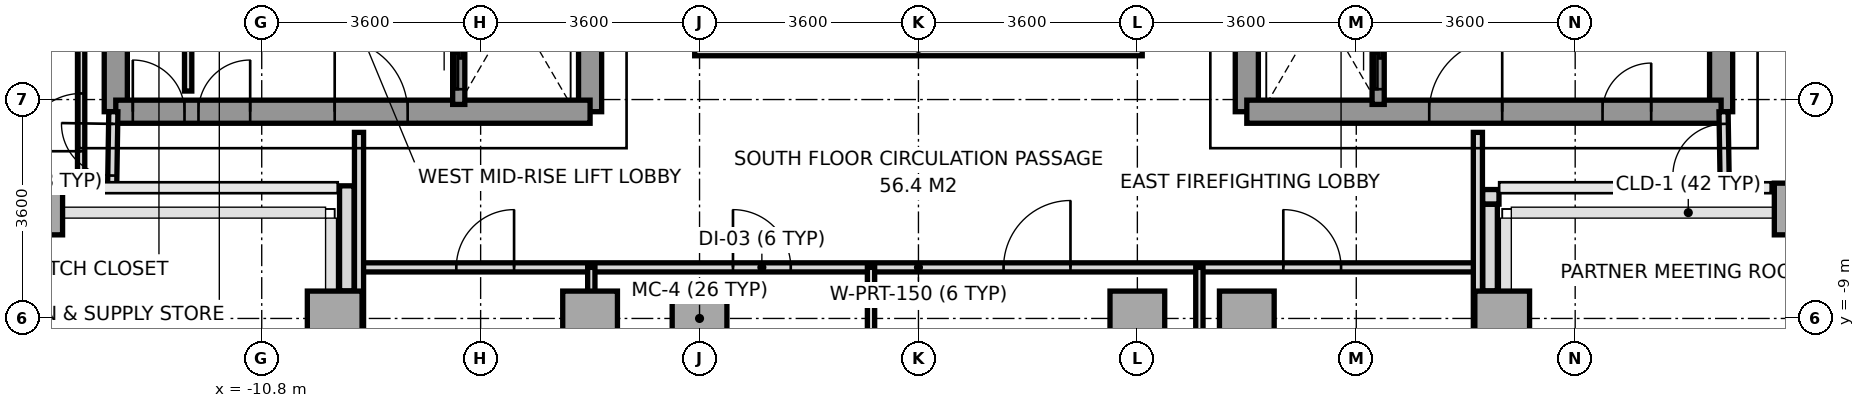
"""IFC4 building model, lengths in metres.
Left out: names, types, materials, properties, quantities, classifications, styles, units other than length and angle.
Written with IfcOpenShell. Run it as: python <this file> out.ifc"""

import sys

from ifc_helpers import new_model, si_unit, direction, frame, frame_2d, origin, origin_2d, place, context, subcontext, project, spatial, rectangle, extrude, source, transform, mapped, element, fill, save


model = new_model("IFC4")
c1 = context("Model", 3, precision=1e-05, world=origin(), true_north=direction((0.0, 1.0)))
c2 = subcontext(c1, "Body", "Model", "MODEL_VIEW")
j1 = project(units=[si_unit("LENGTHUNIT", "METRE"), si_unit("PLANEANGLEUNIT", "RADIAN")], contexts=[c1])
p1 = place(None, origin())
s1 = spatial("IfcSite", under=j1, at=p1, CompositionType="ELEMENT")
p2 = place(p1, origin())
s2 = spatial("IfcBuilding", under=s1, at=p2, CompositionType="ELEMENT")
p3 = place(p2, frame((0.0, 0.0, 167.2)))
s3 = spatial("IfcBuildingStorey", under=s2, at=p3, CompositionType="ELEMENT", Elevation=167.2)
m1 = source(origin(), c2, "Body", "SweptSolid", [
    extrude(rectangle(XDim=0.65, YDim=0.85, at=origin_2d()), origin(), (0.0, 0.0, 1.0), 3.2),
])
p4 = place(p3, frame((-14.4, -7.2, 0.0), z_axis=(0.0, 0.0, 1.0), x_axis=(1.0, 0.0, 0.0)))
e1 = element("IfcColumn", 1, at=p4, inside=s3, PredefinedType="COLUMN", context=c2, shape_type="MappedRepresentation", body=[
    mapped(m1, transform((0.0, 0.0, 0.0), x_axis=(1.0, 0.0, 0.0), y_axis=(0.0, 1.0, 0.0), z_axis=(0.0, 0.0, 1.0), scale=1.0)),
])
m2 = source(origin(), c2, "Body", "SweptSolid", [
    extrude(rectangle(XDim=0.9, YDim=0.9, at=origin_2d()), origin(), (0.0, 0.0, 1.0), 3.2),
])
for number, where, z_axis, x_axis in (
    (2, (-9.6, -9.0, 0.0), (0.0, 0.0, 1.0), (1.0, 0.0, 0.0)),
    (3, (-5.4, -9.0, 0.0), (0.0, 0.0, 1.0), (1.0, 0.0, 0.0)),
    (4, (-3.6, -9.0, 0.0), (0.0, 0.0, 1.0), (1.0, 0.0, 0.0)),
    (5, (3.6, -9.0, 0.0), (0.0, 0.0, 1.0), (1.0, 0.0, 0.0)),
    (6, (5.4, -9.0, 0.0), (0.0, 0.0, 1.0), (1.0, 0.0, 0.0)),
    (7, (9.6, -9.0, 0.0), (0.0, 0.0, 1.0), (1.0, 0.0, 0.0)),
):
    element("IfcColumn", number, at=place(p3, frame(where, z_axis=z_axis, x_axis=x_axis)), inside=s3, PredefinedType="COLUMN", context=c2, shape_type="MappedRepresentation", body=[
        mapped(m2, transform((0.0, 0.0, 0.0), x_axis=(1.0, 0.0, 0.0), y_axis=(0.0, 1.0, 0.0), z_axis=(0.0, 0.0, 1.0), scale=1.0)),
    ])
p5 = place(p3, frame((14.4, -7.2, 0.0), z_axis=(0.0, 0.0, 1.0), x_axis=(1.0, 0.0, 0.0)))
e8 = element("IfcColumn", 8, at=p5, inside=s3, PredefinedType="COLUMN", context=c2, shape_type="MappedRepresentation", body=[
    mapped(m1, transform((0.0, 0.0, 0.0), x_axis=(1.0, 0.0, 0.0), y_axis=(0.0, 1.0, 0.0), z_axis=(0.0, 0.0, 1.0), scale=1.0)),
])
p6 = place(p3, frame((9.547, -7.0, 0.0), z_axis=(0.0, 0.0, 1.0), x_axis=(-1.0, 0.0, 0.0)))
e9 = element("IfcWall", 9, at=p6, inside=s3, PredefinedType="PARAPET", context=c2, shape_type="SweptSolid", body=[
    extrude(rectangle(XDim=0.269, YDim=0.24, at=frame_2d((0.135, 0.0))), origin(), (0.0, 0.0, 1.0), 1.15),
])
p7 = place(p3, frame((9.4, -7.123, 0.0), z_axis=(0.0, 0.0, 1.0), x_axis=(0.0, -1.0, 0.0)))
e10 = element("IfcWall", 10, at=p7, inside=s3, PredefinedType="PARAPET", context=c2, shape_type="SweptSolid", body=[
    extrude(rectangle(XDim=1.424, YDim=0.24, at=frame_2d((0.712, 0.0))), origin(), (0.0, 0.0, 1.0), 1.15),
])
p8 = place(p3, frame((-9.4, -8.547, 0.0), z_axis=(0.0, 0.0, 1.0), x_axis=(0.0, 1.0, 0.0)))
e11 = element("IfcWall", 11, at=p8, inside=s3, PredefinedType="PARAPET", context=c2, shape_type="SweptSolid", body=[
    extrude(rectangle(XDim=1.728, YDim=0.24, at=frame_2d((0.864, 0.0))), origin(), (0.0, 0.0, 1.0), 1.15),
])
p9 = place(p3, frame((-13.2, -5.6, 0.0), z_axis=(0.0, 0.0, 1.0), x_axis=(0.0, 1.0, 0.0)))
e12 = element("IfcWall", 12, at=p9, inside=s3, PredefinedType="SHEAR", context=c2, shape_type="SweptSolid", body=[
    extrude(rectangle(XDim=11.2, YDim=0.38, at=frame_2d((5.6, 0.0))), origin(), (0.0, 0.0, 1.0), 3.2),
])
p10 = place(p3, frame((-5.4, -5.6, 0.0), z_axis=(0.0, 0.0, 1.0), x_axis=(0.0, 1.0, 0.0)))
e13 = element("IfcWall", 13, at=p10, inside=s3, PredefinedType="SHEAR", context=c2, shape_type="SweptSolid", body=[
    extrude(rectangle(XDim=12.5, YDim=0.38, at=frame_2d((6.25, 0.0))), origin(), (0.0, 0.0, 1.0), 3.2),
])
p11 = place(p10, frame((4.55, 0.0, 0.0)))
e14 = element("IfcOpeningElement", 14, at=p11, cuts=e13, PredefinedType="OPENING", context=c2, shape_type="SweptSolid", body=[
    extrude(rectangle(XDim=1.2, YDim=2.2, at=frame_2d((0.6, 1.1))), frame((0.0, 0.2, 0.0), z_axis=(0.0, -1.0, 0.0), x_axis=(1.0, 0.0, 0.0)), (0.0, 0.0, 1.0), 0.4),
])
p12 = place(p10, frame((6.86, 0.0, 0.0)))
e15 = element("IfcOpeningElement", 15, at=p12, cuts=e13, PredefinedType="OPENING", context=c2, shape_type="SweptSolid", body=[
    extrude(rectangle(XDim=0.8, YDim=2.1, at=frame_2d((0.4, 1.05))), frame((0.0, 0.2, 0.0), z_axis=(0.0, -1.0, 0.0), x_axis=(1.0, 0.0, 0.0)), (0.0, 0.0, 1.0), 0.4),
])
p13 = place(p3, frame((-13.2, -5.6, 0.0), z_axis=(0.0, 0.0, 1.0), x_axis=(1.0, 0.0, 0.0)))
e16 = element("IfcWall", 16, at=p13, inside=s3, PredefinedType="SHEAR", context=c2, shape_type="SweptSolid", body=[
    extrude(rectangle(XDim=7.8, YDim=0.38, at=frame_2d((3.9, 0.0))), origin(), (0.0, 0.0, 1.0), 3.2),
])
p14 = place(p13, frame((3.6, 0.0, 0.0)))
e17 = element("IfcOpeningElement", 17, at=p14, cuts=e16, PredefinedType="OPENING", context=c2, shape_type="SweptSolid", body=[
    extrude(rectangle(XDim=1.2, YDim=2.2, at=frame_2d((0.6, 1.1))), frame((0.0, 0.2, 0.0), z_axis=(0.0, -1.0, 0.0), x_axis=(1.0, 0.0, 0.0)), (0.0, 0.0, 1.0), 0.4),
])
p15 = place(p13, frame((0.28, 0.0, 0.0)))
e18 = element("IfcOpeningElement", 18, at=p15, cuts=e16, PredefinedType="OPENING", context=c2, shape_type="SweptSolid", body=[
    extrude(rectangle(XDim=0.85, YDim=2.1, at=frame_2d((0.425, 1.05))), frame((0.0, 0.2, 0.0), z_axis=(0.0, -1.0, 0.0), x_axis=(1.0, 0.0, 0.0)), (0.0, 0.0, 1.0), 0.4),
])
p16 = place(p13, frame((1.36, 0.0, 0.0)))
e19 = element("IfcOpeningElement", 19, at=p16, cuts=e16, PredefinedType="OPENING", context=c2, shape_type="SweptSolid", body=[
    extrude(rectangle(XDim=0.85, YDim=2.1, at=frame_2d((0.425, 1.05))), frame((0.0, 0.2, 0.0), z_axis=(0.0, -1.0, 0.0), x_axis=(1.0, 0.0, 0.0)), (0.0, 0.0, 1.0), 0.4),
])
p17 = place(p3, frame((13.2, -5.6, 0.0), z_axis=(0.0, 0.0, 1.0), x_axis=(0.0, 1.0, 0.0)))
e20 = element("IfcWall", 20, at=p17, inside=s3, PredefinedType="SHEAR", context=c2, shape_type="SweptSolid", body=[
    extrude(rectangle(XDim=11.2, YDim=0.38, at=frame_2d((5.6, 0.0))), origin(), (0.0, 0.0, 1.0), 3.2),
])
p18 = place(p3, frame((5.4, -5.6, 0.0), z_axis=(0.0, 0.0, 1.0), x_axis=(0.0, 1.0, 0.0)))
e21 = element("IfcWall", 21, at=p18, inside=s3, PredefinedType="SHEAR", context=c2, shape_type="SweptSolid", body=[
    extrude(rectangle(XDim=12.5, YDim=0.38, at=frame_2d((6.25, 0.0))), origin(), (0.0, 0.0, 1.0), 3.2),
])
p19 = place(p18, frame((4.55, 0.0, 0.0)))
e22 = element("IfcOpeningElement", 22, at=p19, cuts=e21, PredefinedType="OPENING", context=c2, shape_type="SweptSolid", body=[
    extrude(rectangle(XDim=1.2, YDim=2.2, at=frame_2d((0.6, 1.1))), frame((0.0, 0.2, 0.0), z_axis=(0.0, -1.0, 0.0), x_axis=(1.0, 0.0, 0.0)), (0.0, 0.0, 1.0), 0.4),
])
p20 = place(p18, frame((6.86, 0.0, 0.0)))
e23 = element("IfcOpeningElement", 23, at=p20, cuts=e21, PredefinedType="OPENING", context=c2, shape_type="SweptSolid", body=[
    extrude(rectangle(XDim=0.8, YDim=2.1, at=frame_2d((0.4, 1.05))), frame((0.0, 0.2, 0.0), z_axis=(0.0, -1.0, 0.0), x_axis=(1.0, 0.0, 0.0)), (0.0, 0.0, 1.0), 0.4),
])
p21 = place(p18, frame((7.88, 0.0, 0.0)))
e24 = element("IfcOpeningElement", 24, at=p21, cuts=e21, PredefinedType="OPENING", context=c2, shape_type="SweptSolid", body=[
    extrude(rectangle(XDim=0.8, YDim=2.1, at=frame_2d((0.4, 1.05))), frame((0.0, 0.2, 0.0), z_axis=(0.0, -1.0, 0.0), x_axis=(1.0, 0.0, 0.0)), (0.0, 0.0, 1.0), 0.4),
])
p22 = place(p3, frame((5.4, -5.6, 0.0), z_axis=(0.0, 0.0, 1.0), x_axis=(1.0, 0.0, 0.0)))
e25 = element("IfcWall", 25, at=p22, inside=s3, PredefinedType="SHEAR", context=c2, shape_type="SweptSolid", body=[
    extrude(rectangle(XDim=7.8, YDim=0.38, at=frame_2d((3.9, 0.0))), origin(), (0.0, 0.0, 1.0), 3.2),
])
p23 = place(p22, frame((3.0, 0.0, 0.0)))
e26 = element("IfcOpeningElement", 26, at=p23, cuts=e25, PredefinedType="OPENING", context=c2, shape_type="SweptSolid", body=[
    extrude(rectangle(XDim=1.2, YDim=2.2, at=frame_2d((0.6, 1.1))), frame((0.0, 0.2, 0.0), z_axis=(0.0, -1.0, 0.0), x_axis=(1.0, 0.0, 0.0)), (0.0, 0.0, 1.0), 0.4),
])
p24 = place(p22, frame((5.85, 0.0, 0.0)))
e27 = element("IfcOpeningElement", 27, at=p24, cuts=e25, PredefinedType="OPENING", context=c2, shape_type="SweptSolid", body=[
    extrude(rectangle(XDim=0.8, YDim=2.1, at=frame_2d((0.4, 1.05))), frame((0.0, 0.2, 0.0), z_axis=(0.0, -1.0, 0.0), x_axis=(1.0, 0.0, 0.0)), (0.0, 0.0, 1.0), 0.4),
])
p25 = place(p3, frame((-7.56, -5.48, 0.0), z_axis=(0.0, 0.0, 1.0), x_axis=(0.0, 1.0, 0.0)))
e28 = element("IfcWall", 28, at=p25, inside=s3, PredefinedType="SOLIDWALL", context=c2, shape_type="SweptSolid", body=[
    extrude(rectangle(XDim=1.6, YDim=0.2, at=frame_2d((0.8, 0.0))), origin(), (0.0, 0.0, 1.0), 3.2),
])
p26 = place(p25, frame((0.25, 0.0, 0.0)))
e29 = element("IfcOpeningElement", 29, at=p26, cuts=e28, PredefinedType="OPENING", context=c2, shape_type="SweptSolid", body=[
    extrude(rectangle(XDim=1.1, YDim=2.2, at=frame_2d((0.55, 1.1))), frame((0.0, 0.11, 0.0), z_axis=(0.0, -1.0, 0.0), x_axis=(1.0, 0.0, 0.0)), (0.0, 0.0, 1.0), 0.22),
])
p27 = place(p3, frame((7.56, -5.48, 0.0), z_axis=(0.0, 0.0, 1.0), x_axis=(0.0, 1.0, 0.0)))
e30 = element("IfcWall", 30, at=p27, inside=s3, PredefinedType="SOLIDWALL", context=c2, shape_type="SweptSolid", body=[
    extrude(rectangle(XDim=1.6, YDim=0.2, at=frame_2d((0.8, 0.0))), origin(), (0.0, 0.0, 1.0), 3.2),
])
p28 = place(p27, frame((0.25, 0.0, 0.0)))
e31 = element("IfcOpeningElement", 31, at=p28, cuts=e30, PredefinedType="OPENING", context=c2, shape_type="SweptSolid", body=[
    extrude(rectangle(XDim=1.1, YDim=2.2, at=frame_2d((0.55, 1.1))), frame((0.0, 0.11, 0.0), z_axis=(0.0, -1.0, 0.0), x_axis=(1.0, 0.0, 0.0)), (0.0, 0.0, 1.0), 0.22),
])
p29 = place(p3, frame((-12.01, -5.26, 0.0), z_axis=(0.0, 0.0, 1.0), x_axis=(0.0, 1.0, 0.0)))
e32 = element("IfcWall", 32, at=p29, inside=s3, PredefinedType="PARTITIONING", context=c2, shape_type="SweptSolid", body=[
    extrude(rectangle(XDim=2.94, YDim=0.12, at=frame_2d((1.47, 0.0))), origin(), (0.0, 0.0, 1.0), 3.2),
])
p30 = place(p3, frame((-9.2, -8.16, 0.0), z_axis=(0.0, 0.0, 1.0), x_axis=(1.0, 0.0, 0.0)))
e33 = element("IfcWall", 33, at=p30, inside=s3, PredefinedType="PARTITIONING", context=c2, shape_type="SweptSolid", body=[
    extrude(rectangle(XDim=18.4, YDim=0.15, at=frame_2d((9.2, 0.0))), origin(), (0.0, 0.0, 1.0), 2.8),
])
p31 = place(p30, frame((1.6, 0.0, 0.0)))
e34 = element("IfcOpeningElement", 34, at=p31, cuts=e33, PredefinedType="OPENING", context=c2, shape_type="SweptSolid", body=[
    extrude(rectangle(XDim=0.95, YDim=2.15, at=frame_2d((0.475, 1.075))), frame((0.0, 0.085, 0.0), z_axis=(0.0, -1.0, 0.0), x_axis=(1.0, 0.0, 0.0)), (0.0, 0.0, 1.0), 0.17),
])
p32 = place(p30, frame((6.15, 0.0, 0.0)))
e35 = element("IfcOpeningElement", 35, at=p32, cuts=e33, PredefinedType="OPENING", context=c2, shape_type="SweptSolid", body=[
    extrude(rectangle(XDim=0.95, YDim=2.15, at=frame_2d((0.475, 1.075))), frame((0.0, 0.085, 0.0), z_axis=(0.0, -1.0, 0.0), x_axis=(1.0, 0.0, 0.0)), (0.0, 0.0, 1.0), 0.17),
])
p33 = place(p30, frame((10.6, 0.0, 0.0)))
e36 = element("IfcOpeningElement", 36, at=p33, cuts=e33, PredefinedType="OPENING", context=c2, shape_type="SweptSolid", body=[
    extrude(rectangle(XDim=1.1, YDim=2.2, at=frame_2d((0.55, 1.1))), frame((0.0, 0.085, 0.0), z_axis=(0.0, -1.0, 0.0), x_axis=(1.0, 0.0, 0.0)), (0.0, 0.0, 1.0), 0.17),
])
p34 = place(p30, frame((15.2, 0.0, 0.0)))
e37 = element("IfcOpeningElement", 37, at=p34, cuts=e33, PredefinedType="OPENING", context=c2, shape_type="SweptSolid", body=[
    extrude(rectangle(XDim=0.95, YDim=2.15, at=frame_2d((0.475, 1.075))), frame((0.0, 0.085, 0.0), z_axis=(0.0, -1.0, 0.0), x_axis=(1.0, 0.0, 0.0)), (0.0, 0.0, 1.0), 0.17),
])
for number, where, z_axis, x_axis in (
    (38, (-9.2, -15.68, 0.0), (0.0, 0.0, 1.0), (0.0, 1.0, 0.0)),
    (39, (9.2, -15.68, 0.0), (0.0, 0.0, 1.0), (0.0, 1.0, 0.0)),
):
    element("IfcWall", number, at=place(p3, frame(where, z_axis=z_axis, x_axis=x_axis)), inside=s3, PredefinedType="PARTITIONING", context=c2, shape_type="SweptSolid", body=[
        extrude(rectangle(XDim=9.74, YDim=0.15, at=frame_2d((4.87, 0.0))), origin(), (0.0, 0.0, 1.0), 2.75),
    ])
for number, where, z_axis, x_axis in (
    (40, (-5.38, -24.65, 0.0), (0.0, 0.0, 1.0), (0.0, 1.0, 0.0)),
    (41, (-0.78, -24.65, 0.0), (0.0, 0.0, 1.0), (0.0, 1.0, 0.0)),
    (42, (4.62, -24.65, 0.0), (0.0, 0.0, 1.0), (0.0, 1.0, 0.0)),
):
    element("IfcWall", number, at=place(p3, frame(where, z_axis=z_axis, x_axis=x_axis)), inside=s3, PredefinedType="PARTITIONING", context=c2, shape_type="SweptSolid", body=[
        extrude(rectangle(XDim=16.49, YDim=0.12, at=frame_2d((8.245, 0.0))), origin(), (0.0, 0.0, 1.0), 2.75),
    ])
p35 = place(p3, frame((-13.26, -6.85, 0.0), z_axis=(0.0, 0.0, 1.0), x_axis=(0.016013571389, 0.999871774545, 0.0)))
e43 = element("IfcWall", 43, at=p35, inside=s3, PredefinedType="PARTITIONING", context=c2, shape_type="SweptSolid", body=[
    extrude(rectangle(XDim=1.25, YDim=0.15, at=frame_2d((0.625, 0.0))), origin(), (0.0, 0.0, 1.0), 3.2),
])
p36 = place(p35, frame((0.2, 0.0, 0.0)))
e44 = element("IfcOpeningElement", 44, at=p36, cuts=e43, PredefinedType="OPENING", context=c2, shape_type="SweptSolid", body=[
    extrude(rectangle(XDim=0.85, YDim=2.1, at=frame_2d((0.425, 1.05))), frame((0.0, 0.085, 0.0), z_axis=(0.0, -1.0, 0.0), x_axis=(1.0, 0.0, 0.0)), (0.0, 0.0, 1.0), 0.17),
])
p37 = place(p3, frame((-13.77, -6.85, 0.0), z_axis=(0.0, 0.0, 1.0), x_axis=(0.0, 1.0, 0.0)))
e45 = element("IfcWall", 45, at=p37, inside=s3, PredefinedType="PARTITIONING", context=c2, shape_type="SweptSolid", body=[
    extrude(rectangle(XDim=13.7, YDim=0.12, at=frame_2d((6.85, 0.0))), origin(), (0.0, 0.0, 1.0), 2.87),
])
p38 = place(p37, frame((0.6, 0.0, 0.0)))
e46 = element("IfcOpeningElement", 46, at=p38, cuts=e45, PredefinedType="OPENING", context=c2, shape_type="SweptSolid", body=[
    extrude(rectangle(XDim=0.95, YDim=2.15, at=frame_2d((0.475, 1.075))), frame((0.0, 0.07, 0.0), z_axis=(0.0, -1.0, 0.0), x_axis=(1.0, 0.0, 0.0)), (0.0, 0.0, 1.0), 0.14),
])
p39 = place(p3, frame((13.26, -6.85, 0.0), z_axis=(0.0, 0.0, 1.0), x_axis=(-0.016013571389, 0.999871774545, 0.0)))
e47 = element("IfcWall", 47, at=p39, inside=s3, PredefinedType="PARTITIONING", context=c2, shape_type="SweptSolid", body=[
    extrude(rectangle(XDim=1.25, YDim=0.15, at=frame_2d((0.625, 0.0))), origin(), (0.0, 0.0, 1.0), 3.2),
])
p40 = place(p39, frame((0.2, 0.0, 0.0)))
e48 = element("IfcOpeningElement", 48, at=p40, cuts=e47, PredefinedType="OPENING", context=c2, shape_type="SweptSolid", body=[
    extrude(rectangle(XDim=0.85, YDim=2.1, at=frame_2d((0.425, 1.05))), frame((0.0, 0.085, 0.0), z_axis=(0.0, -1.0, 0.0), x_axis=(1.0, 0.0, 0.0)), (0.0, 0.0, 1.0), 0.17),
])
p41 = place(p3, frame((-3.68, -4.56, 0.0), z_axis=(0.0, 0.0, 1.0), x_axis=(1.0, 0.0, 0.0)))
e49 = element("IfcWall", 49, at=p41, inside=s3, PredefinedType="PARAPET", context=c2, shape_type="SweptSolid", body=[
    extrude(rectangle(XDim=7.36, YDim=0.24, at=frame_2d((3.68, 0.0))), origin(), (0.0, 0.0, 1.0), 1.15),
])
m3 = source(origin(), c2, "Body", "SweptSolid", [
    extrude(rectangle(XDim=1.2, YDim=2.2, at=frame_2d((0.6, 1.1))), frame((0.0, 0.025, 0.0), z_axis=(0.0, -1.0, 0.0), x_axis=(1.0, 0.0, 0.0)), (0.0, 0.0, 1.0), 0.05),
])
p42 = place(p14, origin())
e50 = element("IfcDoor", 50, at=p42, inside=s3, OperationType="SINGLE_SWING_LEFT", PredefinedType="DOOR", context=c2, shape_type="MappedRepresentation", body=[
    mapped(m3, transform((0.0, 0.0, 0.0), x_axis=(1.0, 0.0, 0.0), y_axis=(0.0, 1.0, 0.0), z_axis=(0.0, 0.0, 1.0), scale=1.0)),
])
fill(e17, e50)
p43 = place(p23, origin())
e51 = element("IfcDoor", 51, at=p43, inside=s3, OperationType="SINGLE_SWING_RIGHT", PredefinedType="DOOR", context=c2, shape_type="MappedRepresentation", body=[
    mapped(m3, transform((0.0, 0.0, 0.0), x_axis=(1.0, 0.0, 0.0), y_axis=(0.0, 1.0, 0.0), z_axis=(0.0, 0.0, 1.0), scale=1.0)),
])
fill(e26, e51)
m4 = source(origin(), c2, "Body", "SweptSolid", [
    extrude(rectangle(XDim=0.85, YDim=2.1, at=frame_2d((0.425, 1.05))), frame((0.0, 0.025, 0.0), z_axis=(0.0, -1.0, 0.0), x_axis=(1.0, 0.0, 0.0)), (0.0, 0.0, 1.0), 0.05),
])
p44 = place(p15, origin())
e52 = element("IfcDoor", 52, at=p44, inside=s3, OperationType="SINGLE_SWING_LEFT", PredefinedType="DOOR", context=c2, shape_type="MappedRepresentation", body=[
    mapped(m4, transform((0.0, 0.0, 0.0), x_axis=(1.0, 0.0, 0.0), y_axis=(0.0, 1.0, 0.0), z_axis=(0.0, 0.0, 1.0), scale=1.0)),
])
fill(e18, e52)
p45 = place(p16, origin())
e53 = element("IfcDoor", 53, at=p45, inside=s3, OperationType="SINGLE_SWING_RIGHT", PredefinedType="DOOR", context=c2, shape_type="MappedRepresentation", body=[
    mapped(m4, transform((0.0, 0.0, 0.0), x_axis=(1.0, 0.0, 0.0), y_axis=(0.0, 1.0, 0.0), z_axis=(0.0, 0.0, 1.0), scale=1.0)),
])
fill(e19, e53)
m5 = source(origin(), c2, "Body", "SweptSolid", [
    extrude(rectangle(XDim=0.8, YDim=2.1, at=frame_2d((0.4, 1.05))), frame((0.0, 0.025, 0.0), z_axis=(0.0, -1.0, 0.0), x_axis=(1.0, 0.0, 0.0)), (0.0, 0.0, 1.0), 0.05),
])
p46 = place(p24, origin())
e54 = element("IfcDoor", 54, at=p46, inside=s3, OperationType="SINGLE_SWING_RIGHT", PredefinedType="DOOR", context=c2, shape_type="MappedRepresentation", body=[
    mapped(m5, transform((0.0, 0.0, 0.0), x_axis=(1.0, 0.0, 0.0), y_axis=(0.0, 1.0, 0.0), z_axis=(0.0, 0.0, 1.0), scale=1.0)),
])
fill(e27, e54)
m6 = source(origin(), c2, "Body", "SweptSolid", [
    extrude(rectangle(XDim=1.1, YDim=2.2, at=frame_2d((0.55, 1.1))), frame((0.0, 0.025, 0.0), z_axis=(0.0, -1.0, 0.0), x_axis=(1.0, 0.0, 0.0)), (0.0, 0.0, 1.0), 0.05),
])
p47 = place(p26, origin())
e55 = element("IfcDoor", 55, at=p47, inside=s3, OperationType="SLIDING_TO_LEFT", PredefinedType="DOOR", context=c2, shape_type="MappedRepresentation", body=[
    mapped(m6, transform((0.0, 0.0, 0.0), x_axis=(1.0, 0.0, 0.0), y_axis=(0.0, 1.0, 0.0), z_axis=(0.0, 0.0, 1.0), scale=1.0)),
])
fill(e29, e55)
p48 = place(p28, origin())
e56 = element("IfcDoor", 56, at=p48, inside=s3, OperationType="SLIDING_TO_LEFT", PredefinedType="DOOR", context=c2, shape_type="MappedRepresentation", body=[
    mapped(m6, transform((0.0, 0.0, 0.0), x_axis=(1.0, 0.0, 0.0), y_axis=(0.0, 1.0, 0.0), z_axis=(0.0, 0.0, 1.0), scale=1.0)),
])
fill(e31, e56)
m7 = source(origin(), c2, "Body", "SweptSolid", [
    extrude(rectangle(XDim=0.95, YDim=2.15, at=frame_2d((0.475, 1.075))), frame((0.0, 0.025, 0.0), z_axis=(0.0, -1.0, 0.0), x_axis=(1.0, 0.0, 0.0)), (0.0, 0.0, 1.0), 0.05),
])
p49 = place(p31, origin())
e57 = element("IfcDoor", 57, at=p49, inside=s3, OperationType="SINGLE_SWING_RIGHT", PredefinedType="DOOR", context=c2, shape_type="MappedRepresentation", body=[
    mapped(m7, transform((0.0, 0.0, 0.0), x_axis=(1.0, 0.0, 0.0), y_axis=(0.0, 1.0, 0.0), z_axis=(0.0, 0.0, 1.0), scale=1.0)),
])
fill(e34, e57)
p50 = place(p32, origin())
e58 = element("IfcDoor", 58, at=p50, inside=s3, OperationType="SINGLE_SWING_LEFT", PredefinedType="DOOR", context=c2, shape_type="MappedRepresentation", body=[
    mapped(m7, transform((0.0, 0.0, 0.0), x_axis=(1.0, 0.0, 0.0), y_axis=(0.0, 1.0, 0.0), z_axis=(0.0, 0.0, 1.0), scale=1.0)),
])
fill(e35, e58)
p51 = place(p33, origin())
e59 = element("IfcDoor", 59, at=p51, inside=s3, OperationType="SINGLE_SWING_RIGHT", PredefinedType="DOOR", context=c2, shape_type="MappedRepresentation", body=[
    mapped(m6, transform((0.0, 0.0, 0.0), x_axis=(1.0, 0.0, 0.0), y_axis=(0.0, 1.0, 0.0), z_axis=(0.0, 0.0, 1.0), scale=1.0)),
])
fill(e36, e59)
p52 = place(p34, origin())
e60 = element("IfcDoor", 60, at=p52, inside=s3, OperationType="SINGLE_SWING_LEFT", PredefinedType="DOOR", context=c2, shape_type="MappedRepresentation", body=[
    mapped(m7, transform((0.0, 0.0, 0.0), x_axis=(1.0, 0.0, 0.0), y_axis=(0.0, 1.0, 0.0), z_axis=(0.0, 0.0, 1.0), scale=1.0)),
])
fill(e37, e60)
p53 = place(p38, origin())
e61 = element("IfcDoor", 61, at=p53, inside=s3, OperationType="SINGLE_SWING_LEFT", PredefinedType="DOOR", context=c2, shape_type="MappedRepresentation", body=[
    mapped(m7, transform((0.0, 0.0, 0.0), x_axis=(1.0, 0.0, 0.0), y_axis=(0.0, 1.0, 0.0), z_axis=(0.0, 0.0, 1.0), scale=1.0)),
])
fill(e46, e61)
p54 = place(p36, origin())
e62 = element("IfcDoor", 62, at=p54, inside=s3, OperationType="SINGLE_SWING_RIGHT", PredefinedType="DOOR", context=c2, shape_type="MappedRepresentation", body=[
    mapped(m4, transform((0.0, 0.0, 0.0), x_axis=(1.0, 0.0, 0.0), y_axis=(0.0, 1.0, 0.0), z_axis=(0.0, 0.0, 1.0), scale=1.0)),
])
fill(e44, e62)
p55 = place(p40, origin())
e63 = element("IfcDoor", 63, at=p55, inside=s3, OperationType="SINGLE_SWING_LEFT", PredefinedType="DOOR", context=c2, shape_type="MappedRepresentation", body=[
    mapped(m4, transform((0.0, 0.0, 0.0), x_axis=(1.0, 0.0, 0.0), y_axis=(0.0, 1.0, 0.0), z_axis=(0.0, 0.0, 1.0), scale=1.0)),
])
fill(e48, e63)
save(model, sys.argv[1])
